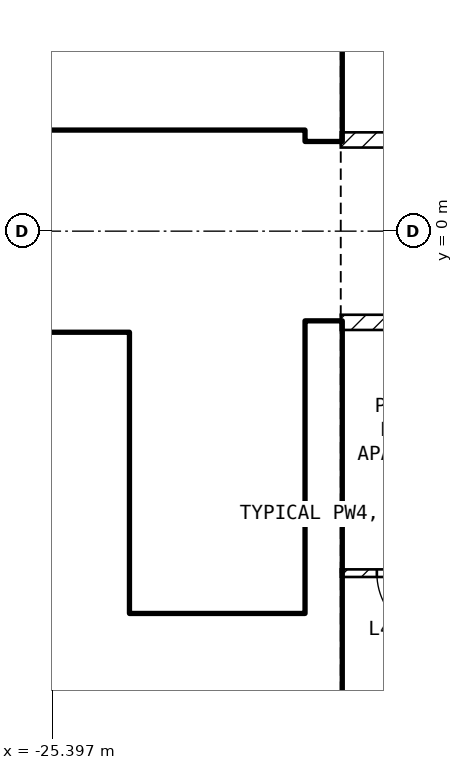
"""IFC4 building model, lengths in metres.
Left out: names, types, materials, properties, quantities, classifications, styles, units other than length and angle.
Written with IfcOpenShell. Run it as: python <this file> out.ifc"""

import sys

from ifc_helpers import new_model, si_unit, direction, frame, frame_2d, origin, place, context, subcontext, project, spatial, rectangle, extrude, element, fill, save


model = new_model("IFC4")
c1 = context("Model", 3, precision=1e-05, world=origin(), true_north=direction((0.0, 1.0)))
c2 = subcontext(c1, "Body", "Model", "MODEL_VIEW")
j1 = project(units=[si_unit("LENGTHUNIT", "METRE"), si_unit("PLANEANGLEUNIT", "RADIAN")], contexts=[c1])
p1 = place(None, origin())
s1 = spatial("IfcSite", under=j1, at=p1, CompositionType="ELEMENT")
p2 = place(p1, origin())
s2 = spatial("IfcBuilding", under=s1, at=p2, CompositionType="ELEMENT")
p3 = place(p2, frame((0.0, 0.0, 187.6)))
s3 = spatial("IfcBuildingStorey", under=s2, at=p3, CompositionType="ELEMENT", Elevation=187.6)
for number, where, z_axis, x_axis in (
    (1, (-21.825, -8.1, 0.0), (0.0, 0.0, 1.0), (0.0, 1.0, 0.0)),
    (2, (-21.825, 1.2, 0.0), (0.0, 0.0, 1.0), (0.0, 1.0, 0.0)),
):
    element("IfcWall", number, at=place(p3, frame(where, z_axis=z_axis, x_axis=x_axis)), inside=s3, PredefinedType="SHEAR", context=c2, shape_type="SweptSolid", body=[
        extrude(rectangle(XDim=6.9, YDim=0.45, at=frame_2d((3.45, 0.0))), origin(), (0.0, 0.0, 1.0), 3.25),
    ])
p4 = place(p3, frame((-33.2, 1.45, 0.0), z_axis=(0.0, 0.0, 1.0), x_axis=(1.0, 0.0, 0.0)))
e3 = element("IfcWall", 3, at=p4, inside=s3, PredefinedType="SOLIDWALL", context=c2, shape_type="SweptSolid", body=[
    extrude(rectangle(XDim=11.15, YDim=0.2, at=frame_2d((5.575, 0.0))), origin(), (0.0, 0.0, 1.0), 3.25),
])
p5 = place(p4, frame((9.4, 0.0, 0.0)))
e4 = element("IfcOpeningElement", 4, at=p5, cuts=e3, PredefinedType="OPENING", context=c2, shape_type="SweptSolid", body=[
    extrude(rectangle(XDim=1.0, YDim=2.1, at=frame_2d((0.5, 1.05))), frame((0.0, 0.11, 0.0), z_axis=(0.0, -1.0, 0.0), x_axis=(1.0, 0.0, 0.0)), (0.0, 0.0, 1.0), 0.22),
])
p6 = place(p4, frame((6.9, 0.0, 0.0)))
e5 = element("IfcOpeningElement", 5, at=p6, cuts=e3, PredefinedType="OPENING", context=c2, shape_type="SweptSolid", body=[
    extrude(rectangle(XDim=1.0, YDim=2.1, at=frame_2d((0.5, 1.05))), frame((0.0, 0.11, 0.0), z_axis=(0.0, -1.0, 0.0), x_axis=(1.0, 0.0, 0.0)), (0.0, 0.0, 1.0), 0.22),
])
p7 = place(p4, frame((1.1, 0.0, 0.0)))
e6 = element("IfcOpeningElement", 6, at=p7, cuts=e3, PredefinedType="OPENING", context=c2, shape_type="SweptSolid", body=[
    extrude(rectangle(XDim=0.9, YDim=2.1, at=frame_2d((0.45, 1.05))), frame((0.0, 0.11, 0.0), z_axis=(0.0, -1.0, 0.0), x_axis=(1.0, 0.0, 0.0)), (0.0, 0.0, 1.0), 0.22),
])
p8 = place(p3, frame((-24.5, -5.05, 0.0), z_axis=(0.0, 0.0, 1.0), x_axis=(0.0, 1.0, 0.0)))
e7 = element("IfcWall", 7, at=p8, inside=s3, PredefinedType="SOLIDWALL", context=c2, shape_type="SweptSolid", body=[
    extrude(rectangle(XDim=3.7, YDim=0.2, at=frame_2d((1.85, 0.0))), origin(), (0.0, 0.0, 1.0), 3.25),
])
p9 = place(p8, frame((0.1, 0.0, 0.0)))
e8 = element("IfcOpeningElement", 8, at=p9, cuts=e7, PredefinedType="OPENING", context=c2, shape_type="SweptSolid", body=[
    extrude(rectangle(XDim=0.8, YDim=2.1, at=frame_2d((0.4, 1.05))), frame((0.0, 0.11, 0.0), z_axis=(0.0, -1.0, 0.0), x_axis=(1.0, 0.0, 0.0)), (0.0, 0.0, 1.0), 0.22),
])
p10 = place(p3, frame((-28.35, -5.15, 0.0), z_axis=(0.0, 0.0, 1.0), x_axis=(1.0, 0.0, 0.0)))
e9 = element("IfcWall", 9, at=p10, inside=s3, PredefinedType="SOLIDWALL", context=c2, shape_type="SweptSolid", body=[
    extrude(rectangle(XDim=6.3, YDim=0.2, at=frame_2d((3.15, 0.0))), origin(), (0.0, 0.0, 1.0), 3.25),
])
p11 = place(p10, frame((5.1, 0.0, 0.0)))
e10 = element("IfcOpeningElement", 10, at=p11, cuts=e9, PredefinedType="OPENING", context=c2, shape_type="SweptSolid", body=[
    extrude(rectangle(XDim=1.0, YDim=2.1, at=frame_2d((0.5, 1.05))), frame((0.0, 0.11, 0.0), z_axis=(0.0, -1.0, 0.0), x_axis=(1.0, 0.0, 0.0)), (0.0, 0.0, 1.0), 0.22),
])
p12 = place(p3, frame((-33.2, -1.45, 0.0), z_axis=(0.0, 0.0, 1.0), x_axis=(1.0, 0.0, 0.0)))
e11 = element("IfcWall", 11, at=p12, inside=s3, PredefinedType="SOLIDWALL", context=c2, shape_type="SweptSolid", body=[
    extrude(rectangle(XDim=8.6, YDim=0.2, at=frame_2d((4.3, 0.0))), origin(), (0.0, 0.0, 1.0), 3.25),
])
p13 = place(p12, frame((7.2, 0.0, 0.0)))
e12 = element("IfcOpeningElement", 12, at=p13, cuts=e11, PredefinedType="OPENING", context=c2, shape_type="SweptSolid", body=[
    extrude(rectangle(XDim=1.0, YDim=2.1, at=frame_2d((0.5, 1.05))), frame((0.0, 0.11, 0.0), z_axis=(0.0, -1.0, 0.0), x_axis=(1.0, 0.0, 0.0)), (0.0, 0.0, 1.0), 0.22),
])
p14 = place(p12, frame((5.2, 0.0, 0.0)))
e13 = element("IfcOpeningElement", 13, at=p14, cuts=e11, PredefinedType="OPENING", context=c2, shape_type="SweptSolid", body=[
    extrude(rectangle(XDim=1.0, YDim=2.1, at=frame_2d((0.5, 1.05))), frame((0.0, 0.11, 0.0), z_axis=(0.0, -1.0, 0.0), x_axis=(1.0, 0.0, 0.0)), (0.0, 0.0, 1.0), 0.22),
])
p15 = place(p12, frame((3.2, 0.0, 0.0)))
e14 = element("IfcOpeningElement", 14, at=p15, cuts=e11, PredefinedType="OPENING", context=c2, shape_type="SweptSolid", body=[
    extrude(rectangle(XDim=1.0, YDim=2.1, at=frame_2d((0.5, 1.05))), frame((0.0, 0.11, 0.0), z_axis=(0.0, -1.0, 0.0), x_axis=(1.0, 0.0, 0.0)), (0.0, 0.0, 1.0), 0.22),
])
p16 = place(p12, frame((0.85, 0.0, 0.0)))
e15 = element("IfcOpeningElement", 15, at=p16, cuts=e11, PredefinedType="OPENING", context=c2, shape_type="SweptSolid", body=[
    extrude(rectangle(XDim=0.9, YDim=2.1, at=frame_2d((0.45, 1.05))), frame((0.0, 0.11, 0.0), z_axis=(0.0, -1.0, 0.0), x_axis=(1.0, 0.0, 0.0)), (0.0, 0.0, 1.0), 0.22),
])
p17 = place(p3, frame((-33.2, -3.95, 0.0), z_axis=(0.0, 0.0, 1.0), x_axis=(1.0, 0.0, 0.0)))
e16 = element("IfcWall", 16, at=p17, inside=s3, PredefinedType="SOLIDWALL", context=c2, shape_type="SweptSolid", body=[
    extrude(rectangle(XDim=8.6, YDim=0.2, at=frame_2d((4.3, 0.0))), origin(), (0.0, 0.0, 1.0), 3.25),
])
p18 = place(p3, frame((-21.6, 1.2, 0.0), z_axis=(0.0, 0.0, 1.0), x_axis=(1.0, 0.0, 0.0)))
e17 = element("IfcWall", 17, at=p18, inside=s3, PredefinedType="PARTITIONING", context=c2, shape_type="SweptSolid", body=[
    extrude(rectangle(XDim=17.2, YDim=0.2, at=frame_2d((8.6, 0.0))), origin(), (0.0, 0.0, 1.0), 3.25),
])
p19 = place(p18, frame((6.1, 0.0, 0.0)))
e18 = element("IfcOpeningElement", 18, at=p19, cuts=e17, PredefinedType="OPENING", context=c2, shape_type="SweptSolid", body=[
    extrude(rectangle(XDim=1.0, YDim=2.1, at=frame_2d((0.5, 1.05))), frame((0.0, 0.11, 0.0), z_axis=(0.0, -1.0, 0.0), x_axis=(1.0, 0.0, 0.0)), (0.0, 0.0, 1.0), 0.22),
])
p20 = place(p3, frame((-4.4, -1.2, 0.0), z_axis=(0.0, 0.0, 1.0), x_axis=(-1.0, 0.0, 0.0)))
e19 = element("IfcWall", 19, at=p20, inside=s3, PredefinedType="PARTITIONING", context=c2, shape_type="SweptSolid", body=[
    extrude(rectangle(XDim=17.2, YDim=0.2, at=frame_2d((8.6, 0.0))), origin(), (0.0, 0.0, 1.0), 3.25),
])
p21 = place(p20, frame((5.3, 0.0, 0.0)))
e20 = element("IfcOpeningElement", 20, at=p21, cuts=e19, PredefinedType="OPENING", context=c2, shape_type="SweptSolid", body=[
    extrude(rectangle(XDim=1.0, YDim=2.1, at=frame_2d((0.5, 1.05))), frame((0.0, 0.11, 0.0), z_axis=(0.0, -1.0, 0.0), x_axis=(1.0, 0.0, 0.0)), (0.0, 0.0, 1.0), 0.22),
])
p22 = place(p3, frame((-19.8, -4.5, 0.0), z_axis=(0.0, 0.0, 1.0), x_axis=(-1.0, 0.0, 0.0)))
e21 = element("IfcWall", 21, at=p22, inside=s3, PredefinedType="PARTITIONING", context=c2, shape_type="SweptSolid", body=[
    extrude(rectangle(XDim=1.8, YDim=0.1, at=frame_2d((0.9, 0.0))), origin(), (0.0, 0.0, 1.0), 3.25),
])
p23 = place(p22, frame((0.475, 0.0, 0.0)))
e22 = element("IfcOpeningElement", 22, at=p23, cuts=e21, PredefinedType="OPENING", context=c2, shape_type="SweptSolid", body=[
    extrude(rectangle(XDim=0.85, YDim=2.1, at=frame_2d((0.425, 1.05))), frame((0.0, 0.06, 0.0), z_axis=(0.0, -1.0, 0.0), x_axis=(1.0, 0.0, 0.0)), (0.0, 0.0, 1.0), 0.12),
])
p24 = place(p13, origin())
e23 = element("IfcDoor", 23, at=p24, inside=s3, OperationType="DOUBLE_DOOR_SLIDING", PredefinedType="DOOR", context=c2, shape_type="SweptSolid", body=[
    extrude(rectangle(XDim=1.0, YDim=2.1, at=frame_2d((0.5, 1.05))), frame((0.0, 0.025, 0.0), z_axis=(0.0, -1.0, 0.0), x_axis=(1.0, 0.0, 0.0)), (0.0, 0.0, 1.0), 0.05),
])
fill(e12, e23)
p25 = place(p11, origin())
e24 = element("IfcDoor", 24, at=p25, inside=s3, OperationType="SINGLE_SWING_LEFT", PredefinedType="DOOR", context=c2, shape_type="SweptSolid", body=[
    extrude(rectangle(XDim=1.0, YDim=2.1, at=frame_2d((0.5, 1.05))), frame((0.0, 0.025, 0.0), z_axis=(0.0, -1.0, 0.0), x_axis=(1.0, 0.0, 0.0)), (0.0, 0.0, 1.0), 0.05),
])
fill(e10, e24)
p26 = place(p5, origin())
e25 = element("IfcDoor", 25, at=p26, inside=s3, OperationType="SINGLE_SWING_LEFT", PredefinedType="DOOR", context=c2, shape_type="SweptSolid", body=[
    extrude(rectangle(XDim=1.0, YDim=2.1, at=frame_2d((0.5, 1.05))), frame((0.0, 0.025, 0.0), z_axis=(0.0, -1.0, 0.0), x_axis=(1.0, 0.0, 0.0)), (0.0, 0.0, 1.0), 0.05),
])
fill(e4, e25)
p27 = place(p9, origin())
e26 = element("IfcDoor", 26, at=p27, inside=s3, OperationType="SINGLE_SWING_LEFT", PredefinedType="DOOR", context=c2, shape_type="SweptSolid", body=[
    extrude(rectangle(XDim=0.8, YDim=2.1, at=frame_2d((0.4, 1.05))), frame((0.0, 0.025, 0.0), z_axis=(0.0, -1.0, 0.0), x_axis=(1.0, 0.0, 0.0)), (0.0, 0.0, 1.0), 0.05),
])
fill(e8, e26)
p28 = place(p6, origin())
e27 = element("IfcDoor", 27, at=p28, inside=s3, OperationType="SINGLE_SWING_LEFT", PredefinedType="DOOR", context=c2, shape_type="SweptSolid", body=[
    extrude(rectangle(XDim=1.0, YDim=2.1, at=frame_2d((0.5, 1.05))), frame((0.0, 0.025, 0.0), z_axis=(0.0, -1.0, 0.0), x_axis=(1.0, 0.0, 0.0)), (0.0, 0.0, 1.0), 0.05),
])
fill(e5, e27)
p29 = place(p23, origin())
e28 = element("IfcDoor", 28, at=p29, inside=s3, OperationType="SINGLE_SWING_LEFT", PredefinedType="DOOR", context=c2, shape_type="SweptSolid", body=[
    extrude(rectangle(XDim=0.85, YDim=2.1, at=frame_2d((0.425, 1.05))), frame((0.0, 0.025, 0.0), z_axis=(0.0, -1.0, 0.0), x_axis=(1.0, 0.0, 0.0)), (0.0, 0.0, 1.0), 0.05),
])
fill(e22, e28)
save(model, sys.argv[1])
